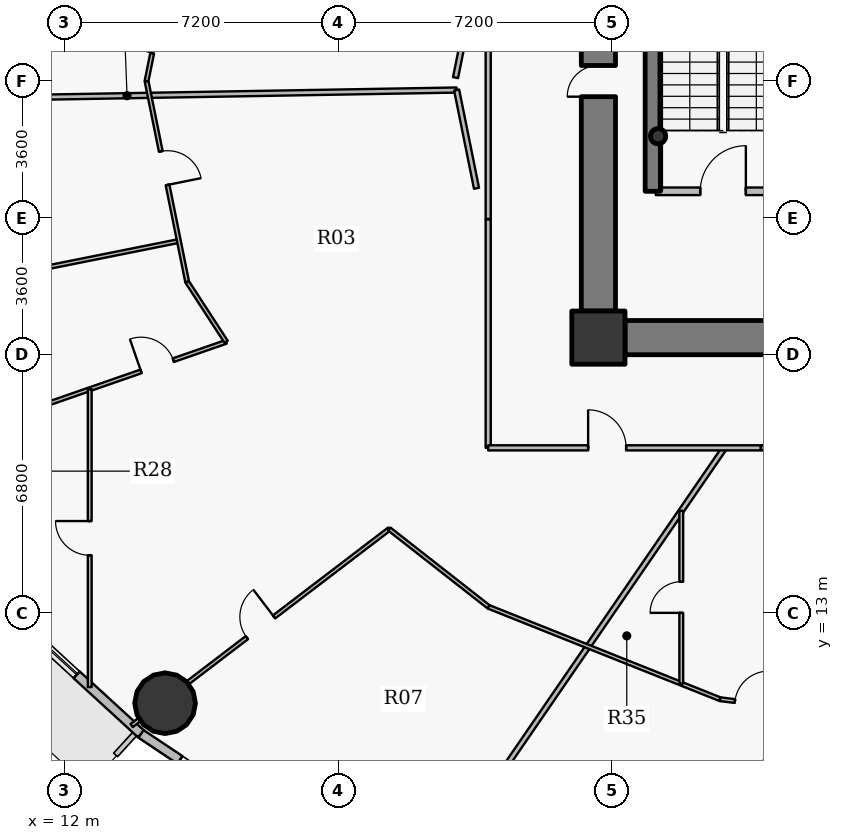
"""IFC4 building model, lengths in metres.
Left out: names, types, materials, properties, quantities, classifications, styles, units other than length and angle.
Written with IfcOpenShell. Run it as: python <this file> out.ifc"""

import sys

from ifc_helpers import new_model, si_unit, direction, frame, frame_2d, origin, origin_2d, place, context, subcontext, project, spatial, rectangle, hollow_circle, extrude, source, transform, mapped, element, fill, save


model = new_model("IFC4")
c1 = context("Model", 3, precision=1e-05, world=origin(), true_north=direction((0.0, 1.0)))
c2 = subcontext(c1, "Body", "Model", "MODEL_VIEW")
j1 = project(units=[si_unit("LENGTHUNIT", "METRE"), si_unit("PLANEANGLEUNIT", "RADIAN")], contexts=[c1])
p1 = place(None, origin())
s1 = spatial("IfcSite", under=j1, at=p1, CompositionType="ELEMENT")
p2 = place(p1, origin())
s2 = spatial("IfcBuilding", under=s1, at=p2, CompositionType="ELEMENT")
p3 = place(p2, frame((0.0, 0.0, 82.8)))
s3 = spatial("IfcBuildingStorey", under=s2, at=p3, CompositionType="ELEMENT", Elevation=82.8)
p4 = place(p3, frame((26.05, 20.25, 0.0), z_axis=(0.0, 0.0, 1.0), x_axis=(1.0, 0.0, 0.0)))
e1 = element("IfcColumn", 1, at=p4, inside=s3, PredefinedType="COLUMN", context=c2, shape_type="SweptSolid", body=[
    extrude(rectangle(XDim=1.4, YDim=1.4, at=origin_2d()), origin(), (0.0, 0.0, 1.0), 4.2),
])
p5 = place(p3, frame((27.48, 24.1, 0.0), z_axis=(0.0, 0.0, 1.0), x_axis=(0.0, 1.0, 0.0)))
e2 = element("IfcWall", 2, at=p5, inside=s3, PredefinedType="SHEAR", context=c2, shape_type="SweptSolid", body=[
    extrude(rectangle(XDim=8.6, YDim=0.4, at=frame_2d((4.3, 0.0))), origin(), (0.0, 0.0, 1.0), 4.2),
])
p6 = place(p3, frame((27.62, 25.55, 0.0), z_axis=(0.0, 0.0, 1.0), x_axis=(1.0, 0.0, 0.0)))
e3 = element("IfcColumn", 3, at=p6, inside=s3, PredefinedType="COLUMN", context=c2, shape_type="SweptSolid", body=[
    extrude(hollow_circle(Radius=0.203, WallThickness=0.016, at=origin_2d()), origin(), (0.0, 0.0, 1.0), 4.2),
])
p7 = place(p3, frame((45.25, 20.25, 0.0), z_axis=(0.0, 0.0, 1.0), x_axis=(-1.0, 0.0, 0.0)))
e4 = element("IfcWall", 4, at=p7, inside=s3, PredefinedType="SHEAR", context=c2, shape_type="SweptSolid", body=[
    extrude(rectangle(XDim=18.5, YDim=0.9, at=frame_2d((9.25, 0.0))), origin(), (0.0, 0.0, 1.0), 3.35),
])
p8 = place(p7, frame((10.0, 0.0, 0.0)))
e5 = element("IfcOpeningElement", 5, at=p8, cuts=e4, PredefinedType="OPENING", context=c2, shape_type="SweptSolid", body=[
    extrude(rectangle(XDim=1.15, YDim=2.15, at=origin_2d()), frame((0.575, 0.46, 1.075), z_axis=(0.0, -1.0, 0.0), x_axis=(1.0, 0.0, 0.0)), (0.0, 0.0, 1.0), 0.92),
])
p9 = place(p3, frame((26.05, 20.95, 0.0), z_axis=(0.0, 0.0, 1.0), x_axis=(0.0, 1.0, 0.0)))
e6 = element("IfcWall", 6, at=p9, inside=s3, PredefinedType="SHEAR", context=c2, shape_type="SweptSolid", body=[
    extrude(rectangle(XDim=12.1, YDim=0.9, at=frame_2d((6.05, 0.0))), origin(), (0.0, 0.0, 1.0), 3.35),
])
p10 = place(p9, frame((5.64, 0.0, 0.0)))
e7 = element("IfcOpeningElement", 7, at=p10, cuts=e6, PredefinedType="OPENING", context=c2, shape_type="SweptSolid", body=[
    extrude(rectangle(XDim=0.82, YDim=2.1, at=origin_2d()), frame((0.41, 0.46, 1.05), z_axis=(0.0, -1.0, 0.0), x_axis=(1.0, 0.0, 0.0)), (0.0, 0.0, 1.0), 0.92),
])
p11 = place(p3, frame((14.647, 10.631, 0.0), z_axis=(0.0, 0.0, 1.0), x_axis=(1.0, 0.0, 0.0)))
e8 = element("IfcColumn", 8, at=p11, inside=s3, PredefinedType="COLUMN", context=c2, shape_type="SweptSolid", body=[
    extrude(hollow_circle(Radius=0.8, WallThickness=0.045, at=origin_2d()), origin(), (0.0, 0.0, 1.0), 4.2),
])
p12 = place(p3, frame((14.015, 9.824, 0.0), z_axis=(0.0, 0.0, 1.0), x_axis=(-0.737116376281, 0.67576582321, 0.0)))
e9 = element("IfcWall", 9, at=p12, inside=s3, PredefinedType="SOLIDWALL", context=c2, shape_type="SweptSolid", body=[
    extrude(rectangle(XDim=4.294, YDim=0.24, at=frame_2d((2.147, 0.0))), origin(), (0.0, 0.0, 1.0), 3.9),
])
p13 = place(p12, frame((2.3, 0.0, 0.9)))
e10 = element("IfcOpeningElement", 10, at=p13, cuts=e9, PredefinedType="OPENING", context=c2, shape_type="SweptSolid", body=[
    extrude(rectangle(XDim=1.25, YDim=1.65, at=origin_2d()), frame((0.625, 0.13, 0.825), z_axis=(0.0, -1.0, 0.0), x_axis=(1.0, 0.0, 0.0)), (0.0, 0.0, 1.0), 0.26),
])
p14 = place(p3, frame((17.723, 7.344, 0.0), z_axis=(0.0, 0.0, 1.0), x_axis=(-0.831240982525, 0.555912249343, 0.0)))
e11 = element("IfcWall", 11, at=p14, inside=s3, PredefinedType="SOLIDWALL", context=c2, shape_type="SweptSolid", body=[
    extrude(rectangle(XDim=4.46, YDim=0.24, at=frame_2d((2.23, 0.0))), origin(), (0.0, 0.0, 1.0), 3.9),
])
p15 = place(p14, frame((1.23, 0.0, 0.9)))
e12 = element("IfcOpeningElement", 12, at=p15, cuts=e11, PredefinedType="OPENING", context=c2, shape_type="SweptSolid", body=[
    extrude(rectangle(XDim=2.0, YDim=1.75, at=origin_2d()), frame((1.0, 0.13, 0.875), z_axis=(0.0, -1.0, 0.0), x_axis=(1.0, 0.0, 0.0)), (0.0, 0.0, 1.0), 0.26),
])
p16 = place(p3, frame((4.974, 26.466, 0.0), z_axis=(0.0, 0.0, 1.0), x_axis=(0.999851881099, 0.017210922752, 0.0)))
e13 = element("IfcWall", 13, at=p16, inside=s3, PredefinedType="PARTITIONING", context=c2, shape_type="SweptSolid", body=[
    extrude(rectangle(XDim=17.349, YDim=0.135, at=frame_2d((8.674, 0.0))), origin(), (0.0, 0.0, 1.0), 3.235),
])
p17 = place(p3, frame((5.982, 20.983, 0.0), z_axis=(0.0, 0.0, 1.0), x_axis=(0.980501056264, 0.19651381291, 0.0)))
e14 = element("IfcWall", 14, at=p17, inside=s3, PredefinedType="PARTITIONING", context=c2, shape_type="SweptSolid", body=[
    extrude(rectangle(XDim=9.208, YDim=0.1, at=frame_2d((4.604, 0.0))), origin(), (0.0, 0.0, 1.0), 3.285),
])
p18 = place(p3, frame((7.675, 17.158, 0.0), z_axis=(0.0, 0.0, 1.0), x_axis=(0.944607706733, 0.328201584976, 0.0)))
e15 = element("IfcWall", 15, at=p18, inside=s3, PredefinedType="PARTITIONING", context=c2, shape_type="SweptSolid", body=[
    extrude(rectangle(XDim=9.083, YDim=0.1, at=frame_2d((4.542, 0.0))), origin(), (0.0, 0.0, 1.0), 3.285),
])
p19 = place(p18, frame((6.713, 0.0, 0.0)))
e16 = element("IfcOpeningElement", 16, at=p19, cuts=e15, PredefinedType="OPENING", context=c2, shape_type="SweptSolid", body=[
    extrude(rectangle(XDim=0.9, YDim=2.1, at=origin_2d()), frame((0.45, 0.06, 1.05), z_axis=(0.0, -1.0, 0.0), x_axis=(1.0, 0.0, 0.0)), (0.0, 0.0, 1.0), 0.12),
])
p20 = place(p18, frame((1.046, 0.0, 0.0)))
e17 = element("IfcOpeningElement", 17, at=p20, cuts=e15, PredefinedType="OPENING", context=c2, shape_type="SweptSolid", body=[
    extrude(rectangle(XDim=0.82, YDim=2.1, at=origin_2d()), frame((0.41, 0.06, 1.05), z_axis=(0.0, -1.0, 0.0), x_axis=(1.0, 0.0, 0.0)), (0.0, 0.0, 1.0), 0.12),
])
p21 = place(p3, frame((12.665, 11.055, 0.0), z_axis=(0.0, 0.0, 1.0), x_axis=(0.0, 1.0, 0.0)))
e18 = element("IfcWall", 18, at=p21, inside=s3, PredefinedType="PARTITIONING", context=c2, shape_type="SweptSolid", body=[
    extrude(rectangle(XDim=7.837, YDim=0.1, at=frame_2d((3.919, 0.0))), origin(), (0.0, 0.0, 1.0), 3.285),
])
p22 = place(p21, frame((3.469, 0.0, 0.0)))
e19 = element("IfcOpeningElement", 19, at=p22, cuts=e18, PredefinedType="OPENING", context=c2, shape_type="SweptSolid", body=[
    extrude(rectangle(XDim=0.9, YDim=2.1, at=origin_2d()), frame((0.45, 0.06, 1.05), z_axis=(0.0, -1.0, 0.0), x_axis=(1.0, 0.0, 0.0)), (0.0, 0.0, 1.0), 0.12),
])
p23 = place(p3, frame((13.768, 10.043, 0.0), z_axis=(0.0, 0.0, 1.0), x_axis=(0.795121316636, 0.606450403439, 0.0)))
e20 = element("IfcWall", 20, at=p23, inside=s3, PredefinedType="PARTITIONING", context=c2, shape_type="SweptSolid", body=[
    extrude(rectangle(XDim=8.525, YDim=0.1, at=frame_2d((4.262, 0.0))), origin(), (0.0, 0.0, 1.0), 3.235),
])
p24 = place(p23, frame((3.812, 0.0, 0.0)))
e21 = element("IfcOpeningElement", 21, at=p24, cuts=e20, PredefinedType="OPENING", context=c2, shape_type="SweptSolid", body=[
    extrude(rectangle(XDim=0.9, YDim=2.1, at=origin_2d()), frame((0.45, 0.06, 1.05), z_axis=(0.0, -1.0, 0.0), x_axis=(1.0, 0.0, 0.0)), (0.0, 0.0, 1.0), 0.12),
])
p25 = place(p3, frame((14.16, 27.0, 0.0), z_axis=(0.0, 0.0, 1.0), x_axis=(0.198292702032, -0.980142848936, 0.0)))
e22 = element("IfcWall", 22, at=p25, inside=s3, PredefinedType="PARTITIONING", context=c2, shape_type="SweptSolid", body=[
    extrude(rectangle(XDim=5.392, YDim=0.1, at=frame_2d((2.696, 0.0))), origin(), (0.0, 0.0, 1.0), 3.235),
])
p26 = place(p25, frame((1.887, 0.0, 0.0)))
e23 = element("IfcOpeningElement", 23, at=p26, cuts=e22, PredefinedType="OPENING", context=c2, shape_type="SweptSolid", body=[
    extrude(rectangle(XDim=0.9, YDim=2.1, at=origin_2d()), frame((0.45, 0.06, 1.05), z_axis=(0.0, -1.0, 0.0), x_axis=(1.0, 0.0, 0.0)), (0.0, 0.0, 1.0), 0.12),
])
p27 = place(p3, frame((14.16, 27.0, 0.0), z_axis=(0.0, 0.0, 1.0), x_axis=(0.198292702032, 0.980142848936, 0.0)))
e24 = element("IfcWall", 24, at=p27, inside=s3, PredefinedType="PARTITIONING", context=c2, shape_type="SweptSolid", body=[
    extrude(rectangle(XDim=5.392, YDim=0.1, at=frame_2d((2.696, 0.0))), origin(), (0.0, 0.0, 1.0), 3.235),
])
p28 = place(p27, frame((0.749, 0.0, 0.0)))
e25 = element("IfcOpeningElement", 25, at=p28, cuts=e24, PredefinedType="OPENING", context=c2, shape_type="SweptSolid", body=[
    extrude(rectangle(XDim=0.9, YDim=2.1, at=origin_2d()), frame((0.45, 0.06, 1.05), z_axis=(0.0, -1.0, 0.0), x_axis=(1.0, 0.0, 0.0)), (0.0, 0.0, 1.0), 0.12),
])
p29 = place(p3, frame((15.229, 21.716, 0.0), z_axis=(0.0, 0.0, 1.0), x_axis=(0.545316895374, -0.838229970604, 0.0)))
e26 = element("IfcWall", 26, at=p29, inside=s3, PredefinedType="PARTITIONING", context=c2, shape_type="SweptSolid", body=[
    extrude(rectangle(XDim=1.88, YDim=0.1, at=frame_2d((0.94, 0.0))), origin(), (0.0, 0.0, 1.0), 3.235),
])
p30 = place(p3, frame((20.547, 15.213, 0.0), z_axis=(0.0, 0.0, 1.0), x_axis=(0.78737784261, -0.616470707307, 0.0)))
e27 = element("IfcWall", 27, at=p30, inside=s3, PredefinedType="PARTITIONING", context=c2, shape_type="SweptSolid", body=[
    extrude(rectangle(XDim=3.323, YDim=0.1, at=frame_2d((1.661, 0.0))), origin(), (0.0, 0.0, 1.0), 3.235),
])
p31 = place(p3, frame((21.309, 5.618, 0.0), z_axis=(0.0, 0.0, 1.0), x_axis=(0.566302415372, 0.82419753357, 0.0)))
e28 = element("IfcWall", 28, at=p31, inside=s3, PredefinedType="PARTITIONING", context=c2, shape_type="SweptSolid", body=[
    extrude(rectangle(XDim=14.234, YDim=0.135, at=frame_2d((7.117, 0.0))), origin(), (0.0, 0.0, 1.0), 3.235),
])
p32 = place(p3, frame((23.15, 17.35, 0.0), z_axis=(0.0, 0.0, 1.0), x_axis=(0.0, 1.0, 0.0)))
e29 = element("IfcWall", 29, at=p32, inside=s3, PredefinedType="PARTITIONING", context=c2, shape_type="SweptSolid", body=[
    extrude(rectangle(XDim=6.011, YDim=0.135, at=frame_2d((3.006, 0.0))), origin(), (0.0, 0.0, 1.0), 3.235),
])
p33 = place(p3, frame((23.15, 17.35, 0.0), z_axis=(0.0, 0.0, 1.0), x_axis=(1.0, 0.0, 0.0)))
e30 = element("IfcWall", 30, at=p33, inside=s3, PredefinedType="PARTITIONING", context=c2, shape_type="SweptSolid", body=[
    extrude(rectangle(XDim=7.171, YDim=0.135, at=frame_2d((3.586, 0.0))), origin(), (0.0, 0.0, 1.0), 3.235),
])
p34 = place(p33, frame((2.63, 0.0, 0.0)))
e31 = element("IfcOpeningElement", 31, at=p34, cuts=e30, PredefinedType="OPENING", context=c2, shape_type="SweptSolid", body=[
    extrude(rectangle(XDim=1.0, YDim=2.15, at=origin_2d()), frame((0.5, 0.078, 1.075), z_axis=(0.0, -1.0, 0.0), x_axis=(1.0, 0.0, 0.0)), (0.0, 0.0, 1.0), 0.155),
])
p35 = place(p3, frame((23.163, 13.165, 0.0), z_axis=(0.0, 0.0, 1.0), x_axis=(0.928799979038, -0.370581433613, 0.0)))
e32 = element("IfcWall", 32, at=p35, inside=s3, PredefinedType="PARTITIONING", context=c2, shape_type="SweptSolid", body=[
    extrude(rectangle(XDim=6.555, YDim=0.1, at=frame_2d((3.278, 0.0))), origin(), (0.0, 0.0, 1.0), 3.235),
])
p36 = place(p3, frame((27.56, 24.1, 0.0), z_axis=(0.0, 0.0, 1.0), x_axis=(1.0, 0.0, 0.0)))
e33 = element("IfcWall", 33, at=p36, inside=s3, PredefinedType="PARTITIONING", context=c2, shape_type="SweptSolid", body=[
    extrude(rectangle(XDim=3.54, YDim=0.2, at=frame_2d((1.77, 0.0))), origin(), (0.0, 0.0, 1.0), 3.9),
])
p37 = place(p36, frame((1.17, 0.0, 0.0)))
e34 = element("IfcOpeningElement", 34, at=p37, cuts=e33, PredefinedType="OPENING", context=c2, shape_type="SweptSolid", body=[
    extrude(rectangle(XDim=1.2, YDim=2.15, at=origin_2d()), frame((0.6, 0.11, 1.075), z_axis=(0.0, -1.0, 0.0), x_axis=(1.0, 0.0, 0.0)), (0.0, 0.0, 1.0), 0.22),
])
p38 = place(p3, frame((28.231, 11.143, 0.0), z_axis=(0.0, 0.0, 1.0), x_axis=(0.0, 1.0, 0.0)))
e35 = element("IfcWall", 35, at=p38, inside=s3, PredefinedType="PARTITIONING", context=c2, shape_type="SweptSolid", body=[
    extrude(rectangle(XDim=4.55, YDim=0.1, at=frame_2d((2.275, 0.0))), origin(), (0.0, 0.0, 1.0), 3.235),
])
p39 = place(p38, frame((1.865, 0.0, 0.0)))
e36 = element("IfcOpeningElement", 36, at=p39, cuts=e35, PredefinedType="OPENING", context=c2, shape_type="SweptSolid", body=[
    extrude(rectangle(XDim=0.82, YDim=2.1, at=origin_2d()), frame((0.41, 0.06, 1.05), z_axis=(0.0, -1.0, 0.0), x_axis=(1.0, 0.0, 0.0)), (0.0, 0.0, 1.0), 0.12),
])
p40 = place(p3, frame((28.689, 3.449, 0.0), z_axis=(0.0, 0.0, 1.0), x_axis=(0.296478934609, 0.955039392556, 0.0)))
e37 = element("IfcWall", 37, at=p40, inside=s3, PredefinedType="PARTITIONING", context=c2, shape_type="SweptSolid", body=[
    extrude(rectangle(XDim=7.417, YDim=0.1, at=frame_2d((3.708, 0.0))), origin(), (0.0, 0.0, 1.0), 3.285),
])
p41 = place(p3, frame((29.251, 10.736, 0.0), z_axis=(0.0, 0.0, 1.0), x_axis=(0.992394520877, -0.123097989151, 0.0)))
e38 = element("IfcWall", 38, at=p41, inside=s3, PredefinedType="PARTITIONING", context=c2, shape_type="SweptSolid", body=[
    extrude(rectangle(XDim=6.801, YDim=0.1, at=frame_2d((3.4, 0.0))), origin(), (0.0, 0.0, 1.0), 3.235),
])
p42 = place(p41, frame((0.395, 0.0, 0.0)))
e39 = element("IfcOpeningElement", 39, at=p42, cuts=e38, PredefinedType="OPENING", context=c2, shape_type="SweptSolid", body=[
    extrude(rectangle(XDim=0.9, YDim=2.1, at=origin_2d()), frame((0.45, 0.06, 1.05), z_axis=(0.0, -1.0, 0.0), x_axis=(1.0, 0.0, 0.0)), (0.0, 0.0, 1.0), 0.12),
])
p43 = place(p3, frame((35.99, 17.35, 0.0), z_axis=(0.0, 0.0, 1.0), x_axis=(-1.0, 0.0, 0.0)))
e40 = element("IfcWall", 40, at=p43, inside=s3, PredefinedType="PARTITIONING", context=c2, shape_type="SweptSolid", body=[
    extrude(rectangle(XDim=5.659, YDim=0.135, at=frame_2d((2.829, 0.0))), origin(), (0.0, 0.0, 1.0), 3.235),
])
p44 = place(p3, frame((23.15, 23.372, 0.0), z_axis=(0.0, 0.0, 1.0), x_axis=(0.0, 1.0, 0.0)))
e41 = element("IfcWall", 41, at=p44, inside=s3, PredefinedType="PARTITIONING", context=c2, shape_type="SweptSolid", body=[
    extrude(rectangle(XDim=7.257, YDim=0.135, at=frame_2d((3.628, 0.0))), origin(), (0.0, 0.0, 1.0), 3.235),
])
p45 = place(p3, frame((25.6, 20.94, 0.0), z_axis=(0.0, 0.0, 1.0), x_axis=(0.0, -1.0, 0.0)))
e42 = element("IfcWall", 42, at=p45, inside=s3, PredefinedType="PARTITIONING", context=c2, shape_type="SweptSolid", body=[
    extrude(rectangle(XDim=1.14, YDim=0.135, at=frame_2d((0.57, 0.0))), origin(), (0.0, 0.0, 1.0), 3.9),
])
p46 = place(p3, frame((25.907, 19.8, 0.0), z_axis=(0.0, 0.0, 1.0), x_axis=(1.0, 0.0, 0.0)))
e43 = element("IfcWall", 43, at=p46, inside=s3, PredefinedType="PARTITIONING", context=c2, shape_type="SweptSolid", body=[
    extrude(rectangle(XDim=0.833, YDim=0.135, at=frame_2d((0.416, 0.0))), origin(), (0.0, 0.0, 1.0), 3.235),
])
p47 = place(p3, frame((22.843, 29.82, 0.0), z_axis=(0.0, 0.0, 1.0), x_axis=(-0.198274261102, -0.98014657954, 0.0)))
e44 = element("IfcWall", 44, at=p47, inside=s3, PredefinedType="PARTITIONING", context=c2, shape_type="SweptSolid", body=[
    extrude(rectangle(XDim=2.784, YDim=0.135, at=frame_2d((1.392, 0.0))), origin(), (0.0, 0.0, 1.0), 3.235),
])
p48 = place(p3, frame((22.32, 26.765, 0.0), z_axis=(0.0, 0.0, 1.0), x_axis=(0.198287516938, -0.980143897918, 0.0)))
e45 = element("IfcWall", 45, at=p48, inside=s3, PredefinedType="PARTITIONING", context=c2, shape_type="SweptSolid", body=[
    extrude(rectangle(XDim=2.637, YDim=0.135, at=frame_2d((1.319, 0.0))), origin(), (0.0, 0.0, 1.0), 3.9),
])
m1 = source(origin(), c2, "Body", "SweptSolid", [
    extrude(rectangle(XDim=1.25, YDim=1.65, at=origin_2d()), frame((0.625, 0.03, 0.825), z_axis=(0.0, -1.0, 0.0), x_axis=(1.0, 0.0, 0.0)), (0.0, 0.0, 1.0), 0.06),
])
p49 = place(p13, origin())
e46 = element("IfcWindow", 46, at=p49, inside=s3, PartitioningType="SINGLE_PANEL", PredefinedType="WINDOW", context=c2, shape_type="MappedRepresentation", body=[
    mapped(m1, transform((0.0, 0.0, 0.0), x_axis=(1.0, 0.0, 0.0), y_axis=(0.0, 1.0, 0.0), z_axis=(0.0, 0.0, 1.0), scale=1.0)),
])
fill(e10, e46)
m2 = source(origin(), c2, "Body", "SweptSolid", [
    extrude(rectangle(XDim=2.0, YDim=1.75, at=origin_2d()), frame((1.0, 0.03, 0.875), z_axis=(0.0, -1.0, 0.0), x_axis=(1.0, 0.0, 0.0)), (0.0, 0.0, 1.0), 0.06),
])
p50 = place(p15, origin())
e47 = element("IfcWindow", 47, at=p50, inside=s3, PartitioningType="DOUBLE_PANEL_VERTICAL", PredefinedType="WINDOW", context=c2, shape_type="MappedRepresentation", body=[
    mapped(m2, transform((0.0, 0.0, 0.0), x_axis=(1.0, 0.0, 0.0), y_axis=(0.0, 1.0, 0.0), z_axis=(0.0, 0.0, 1.0), scale=1.0)),
])
fill(e12, e47)
m3 = source(origin(), c2, "Body", "SweptSolid", [
    extrude(rectangle(XDim=0.82, YDim=2.1, at=origin_2d()), frame((0.41, 0.025, 1.05), z_axis=(0.0, -1.0, 0.0), x_axis=(1.0, 0.0, 0.0)), (0.0, 0.0, 1.0), 0.05),
])
p51 = place(p10, origin())
e48 = element("IfcDoor", 48, at=p51, inside=s3, OperationType="SINGLE_SWING_LEFT", PredefinedType="DOOR", context=c2, shape_type="MappedRepresentation", body=[
    mapped(m3, transform((0.0, 0.0, 0.0), x_axis=(1.0, 0.0, 0.0), y_axis=(0.0, 1.0, 0.0), z_axis=(0.0, 0.0, 1.0), scale=1.0)),
])
fill(e7, e48)
m4 = source(origin(), c2, "Body", "SweptSolid", [
    extrude(rectangle(XDim=1.2, YDim=2.15, at=origin_2d()), frame((0.6, 0.025, 1.075), z_axis=(0.0, -1.0, 0.0), x_axis=(1.0, 0.0, 0.0)), (0.0, 0.0, 1.0), 0.05),
])
p52 = place(p37, origin())
e49 = element("IfcDoor", 49, at=p52, inside=s3, OperationType="SINGLE_SWING_RIGHT", PredefinedType="DOOR", context=c2, shape_type="MappedRepresentation", body=[
    mapped(m4, transform((0.0, 0.0, 0.0), x_axis=(1.0, 0.0, 0.0), y_axis=(0.0, 1.0, 0.0), z_axis=(0.0, 0.0, 1.0), scale=1.0)),
])
fill(e34, e49)
m5 = source(origin(), c2, "Body", "SweptSolid", [
    extrude(rectangle(XDim=0.9, YDim=2.1, at=origin_2d()), frame((0.45, 0.025, 1.05), z_axis=(0.0, -1.0, 0.0), x_axis=(1.0, 0.0, 0.0)), (0.0, 0.0, 1.0), 0.05),
])
p53 = place(p28, origin())
e50 = element("IfcDoor", 50, at=p53, inside=s3, OperationType="SINGLE_SWING_RIGHT", PredefinedType="DOOR", context=c2, shape_type="MappedRepresentation", body=[
    mapped(m5, transform((0.0, 0.0, 0.0), x_axis=(1.0, 0.0, 0.0), y_axis=(0.0, 1.0, 0.0), z_axis=(0.0, 0.0, 1.0), scale=1.0)),
])
fill(e25, e50)
m6 = source(origin(), c2, "Body", "SweptSolid", [
    extrude(rectangle(XDim=1.0, YDim=2.15, at=origin_2d()), frame((0.5, 0.025, 1.075), z_axis=(0.0, -1.0, 0.0), x_axis=(1.0, 0.0, 0.0)), (0.0, 0.0, 1.0), 0.05),
])
p54 = place(p34, origin())
e51 = element("IfcDoor", 51, at=p54, inside=s3, OperationType="SINGLE_SWING_LEFT", PredefinedType="DOOR", context=c2, shape_type="MappedRepresentation", body=[
    mapped(m6, transform((0.0, 0.0, 0.0), x_axis=(1.0, 0.0, 0.0), y_axis=(0.0, 1.0, 0.0), z_axis=(0.0, 0.0, 1.0), scale=1.0)),
])
fill(e31, e51)
p55 = place(p26, origin())
e52 = element("IfcDoor", 52, at=p55, inside=s3, OperationType="SINGLE_SWING_RIGHT", PredefinedType="DOOR", context=c2, shape_type="MappedRepresentation", body=[
    mapped(m5, transform((0.0, 0.0, 0.0), x_axis=(1.0, 0.0, 0.0), y_axis=(0.0, 1.0, 0.0), z_axis=(0.0, 0.0, 1.0), scale=1.0)),
])
fill(e23, e52)
p56 = place(p19, origin())
e53 = element("IfcDoor", 53, at=p56, inside=s3, OperationType="SINGLE_SWING_LEFT", PredefinedType="DOOR", context=c2, shape_type="MappedRepresentation", body=[
    mapped(m5, transform((0.0, 0.0, 0.0), x_axis=(1.0, 0.0, 0.0), y_axis=(0.0, 1.0, 0.0), z_axis=(0.0, 0.0, 1.0), scale=1.0)),
])
fill(e16, e53)
p57 = place(p24, origin())
e54 = element("IfcDoor", 54, at=p57, inside=s3, OperationType="SINGLE_SWING_RIGHT", PredefinedType="DOOR", context=c2, shape_type="MappedRepresentation", body=[
    mapped(m5, transform((0.0, 0.0, 0.0), x_axis=(1.0, 0.0, 0.0), y_axis=(0.0, 1.0, 0.0), z_axis=(0.0, 0.0, 1.0), scale=1.0)),
])
fill(e21, e54)
p58 = place(p22, origin())
e55 = element("IfcDoor", 55, at=p58, inside=s3, OperationType="SINGLE_SWING_RIGHT", PredefinedType="DOOR", context=c2, shape_type="MappedRepresentation", body=[
    mapped(m5, transform((0.0, 0.0, 0.0), x_axis=(1.0, 0.0, 0.0), y_axis=(0.0, 1.0, 0.0), z_axis=(0.0, 0.0, 1.0), scale=1.0)),
])
fill(e19, e55)
p59 = place(p42, origin())
e56 = element("IfcDoor", 56, at=p59, inside=s3, OperationType="SINGLE_SWING_RIGHT", PredefinedType="DOOR", context=c2, shape_type="MappedRepresentation", body=[
    mapped(m5, transform((0.0, 0.0, 0.0), x_axis=(1.0, 0.0, 0.0), y_axis=(0.0, 1.0, 0.0), z_axis=(0.0, 0.0, 1.0), scale=1.0)),
])
fill(e39, e56)
p60 = place(p39, origin())
e57 = element("IfcDoor", 57, at=p60, inside=s3, OperationType="SINGLE_SWING_LEFT", PredefinedType="DOOR", context=c2, shape_type="MappedRepresentation", body=[
    mapped(m3, transform((0.0, 0.0, 0.0), x_axis=(1.0, 0.0, 0.0), y_axis=(0.0, 1.0, 0.0), z_axis=(0.0, 0.0, 1.0), scale=1.0)),
])
fill(e36, e57)
save(model, sys.argv[1])
